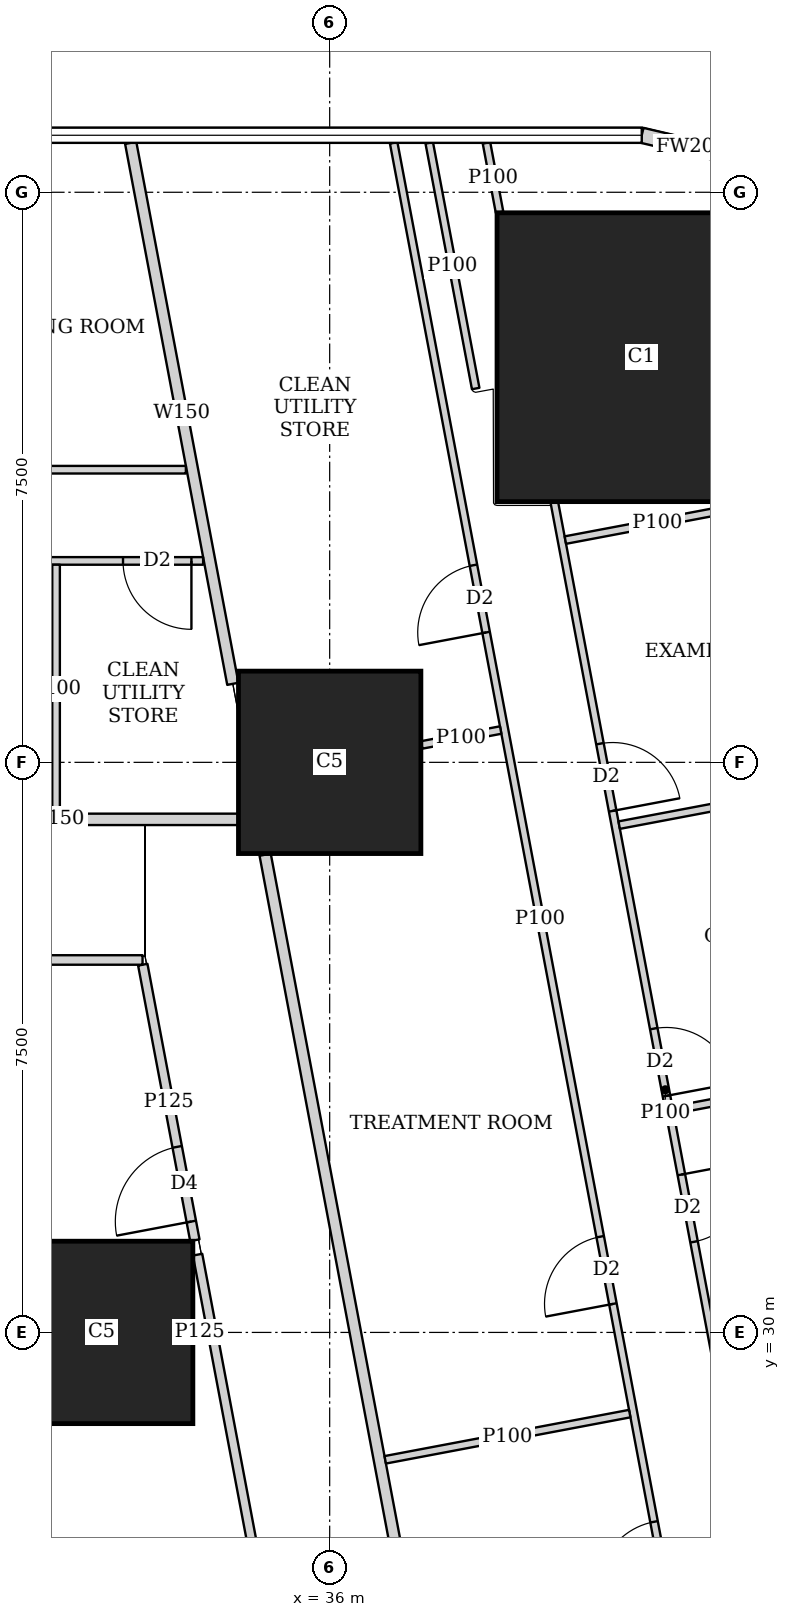
"""IFC4 building model, lengths in metres.
Left out: names, types, materials, properties, quantities, classifications, styles, units other than length and angle.
Written with IfcOpenShell. Run it as: python <this file> out.ifc"""

import sys

from ifc_helpers import new_model, si_unit, direction, frame, frame_2d, origin, origin_2d, place, context, subcontext, project, spatial, rectangle, extrude, element, fill, save


model = new_model("IFC4")
c1 = context("Model", 3, precision=1e-05, world=origin(), true_north=direction((0.0, 1.0)))
c2 = subcontext(c1, "Body", "Model", "MODEL_VIEW")
j1 = project(units=[si_unit("LENGTHUNIT", "METRE"), si_unit("PLANEANGLEUNIT", "RADIAN")], contexts=[c1])
p1 = place(None, origin())
s1 = spatial("IfcSite", under=j1, at=p1, CompositionType="ELEMENT")
p2 = place(p1, origin())
s2 = spatial("IfcBuilding", under=s1, at=p2, CompositionType="ELEMENT")
p3 = place(p2, frame((0.0, 0.0, 5.6)))
s3 = spatial("IfcBuildingStorey", under=s2, at=p3, CompositionType="ELEMENT", Elevation=5.6)
for number, where, z_axis, x_axis in (
    (1, (33.0, 30.0, 0.0), (0.0, 0.0, 1.0), (1.0, 0.0, 0.0)),
    (2, (36.0, 37.5, 0.0), (0.0, 0.0, 1.0), (1.0, 0.0, 0.0)),
):
    element("IfcColumn", number, at=place(p3, frame(where, z_axis=z_axis, x_axis=x_axis)), inside=s3, PredefinedType="COLUMN", context=c2, shape_type="SweptSolid", body=[
        extrude(rectangle(XDim=2.4, YDim=2.4, at=origin_2d()), origin(), (0.0, 0.0, 1.0), 4.5),
    ])
p4 = place(p3, frame((40.102, 42.83, 0.0), z_axis=(0.0, 0.0, 1.0), x_axis=(1.0, 0.0, 0.0)))
e3 = element("IfcColumn", 3, at=p4, inside=s3, PredefinedType="COLUMN", context=c2, shape_type="SweptSolid", body=[
    extrude(rectangle(XDim=3.8, YDim=3.8, at=origin_2d()), origin(), (0.0, 0.0, 1.0), 4.5),
])
p5 = place(p3, frame((41.407, 45.444, 0.0), z_axis=(0.0, 0.0, 1.0), x_axis=(-0.973453091607, 0.228886606077, 0.0)))
e4 = element("IfcWall", 4, at=p5, inside=s3, PredefinedType="SOLIDWALL", context=c2, shape_type="SweptSolid", body=[
    extrude(rectangle(XDim=1.336, YDim=0.2, at=frame_2d((0.668, 0.0))), origin(), (0.0, 0.0, 1.0), 4.2),
])
p6 = place(p3, frame((30.001, 36.75, 0.0), z_axis=(0.0, 0.0, 1.0), x_axis=(1.0, 0.0, 0.0)))
e5 = element("IfcWall", 5, at=p6, inside=s3, PredefinedType="SOLIDWALL", context=c2, shape_type="SweptSolid", body=[
    extrude(rectangle(XDim=4.798, YDim=0.15, at=frame_2d((2.399, 0.0))), origin(), (0.0, 0.0, 1.0), 2.6),
])
p7 = place(p3, frame((33.382, 45.65, 0.0), z_axis=(0.0, 0.0, 1.0), x_axis=(0.185564463355, -0.982632092871, 0.0)))
e6 = element("IfcWall", 6, at=p7, inside=s3, PredefinedType="SOLIDWALL", context=c2, shape_type="SweptSolid", body=[
    extrude(rectangle(XDim=7.243, YDim=0.15, at=frame_2d((3.621, 0.0))), origin(), (0.0, 0.0, 1.0), 2.4),
])
p8 = place(p3, frame((35.151, 36.285, 0.0), z_axis=(0.0, 0.0, 1.0), x_axis=(0.18558085056, -0.982628998099, 0.0)))
e7 = element("IfcWall", 7, at=p8, inside=s3, PredefinedType="SOLIDWALL", context=c2, shape_type="SweptSolid", body=[
    extrude(rectangle(XDim=34.352, YDim=0.15, at=frame_2d((17.176, 0.0))), origin(), (0.0, 0.0, 1.0), 2.4),
])
p9 = place(p8, frame((13.189, 0.0, 0.0)))
e8 = element("IfcOpeningElement", 8, at=p9, cuts=e7, PredefinedType="OPENING", context=c2, shape_type="SweptSolid", body=[
    extrude(rectangle(XDim=1.3, YDim=2.1, at=frame_2d((0.65, 1.05))), frame((0.0, 0.085, 0.0), z_axis=(0.0, -1.0, 0.0), x_axis=(1.0, 0.0, 0.0)), (0.0, 0.0, 1.0), 0.17),
])
p10 = place(p8, frame((19.443, 0.0, 0.0)))
e9 = element("IfcOpeningElement", 9, at=p10, cuts=e7, PredefinedType="OPENING", context=c2, shape_type="SweptSolid", body=[
    extrude(rectangle(XDim=1.3, YDim=2.1, at=frame_2d((0.65, 1.05))), frame((0.0, 0.085, 0.0), z_axis=(0.0, -1.0, 0.0), x_axis=(1.0, 0.0, 0.0)), (0.0, 0.0, 1.0), 0.17),
])
p11 = place(p8, frame((25.444, 0.0, 0.0)))
e10 = element("IfcOpeningElement", 10, at=p11, cuts=e7, PredefinedType="OPENING", context=c2, shape_type="SweptSolid", body=[
    extrude(rectangle(XDim=1.3, YDim=2.1, at=frame_2d((0.65, 1.05))), frame((0.0, 0.085, 0.0), z_axis=(0.0, -1.0, 0.0), x_axis=(1.0, 0.0, 0.0)), (0.0, 0.0, 1.0), 0.17),
])
p12 = place(p3, frame((37.921, 42.418, 0.0), z_axis=(0.0, 0.0, 1.0), x_axis=(-0.185713480744, 0.982603940085, 0.0)))
e11 = element("IfcWall", 11, at=p12, inside=s3, PredefinedType="PARTITIONING", context=c2, shape_type="SweptSolid", body=[
    extrude(rectangle(XDim=3.289, YDim=0.1, at=frame_2d((1.645, 0.0))), origin(), (0.0, 0.0, 1.0), 2.4),
])
p13 = place(p3, frame((38.063, 45.65, 0.0), z_axis=(0.0, 0.0, 1.0), x_axis=(0.185288147753, -0.982684233262, 0.0)))
e12 = element("IfcWall", 12, at=p13, inside=s3, PredefinedType="PARTITIONING", context=c2, shape_type="SweptSolid", body=[
    extrude(rectangle(XDim=0.929, YDim=0.1, at=frame_2d((0.464, 0.0))), origin(), (0.0, 0.0, 1.0), 4.2),
])
p14 = place(p3, frame((38.956, 40.92, 0.0), z_axis=(0.0, 0.0, 1.0), x_axis=(0.185636914727, -0.982618408077, 0.0)))
e13 = element("IfcWall", 13, at=p14, inside=s3, PredefinedType="PARTITIONING", context=c2, shape_type="SweptSolid", body=[
    extrude(rectangle(XDim=15.729, YDim=0.1, at=frame_2d((7.865, 0.0))), origin(), (0.0, 0.0, 1.0), 2.6),
])
p15 = place(p14, frame((14.679, 0.0, 0.0)))
e14 = element("IfcOpeningElement", 14, at=p15, cuts=e13, PredefinedType="OPENING", context=c2, shape_type="SweptSolid", body=[
    extrude(rectangle(XDim=0.9, YDim=2.1, at=frame_2d((0.45, 1.05))), frame((0.0, 0.06, 0.0), z_axis=(0.0, -1.0, 0.0), x_axis=(1.0, 0.0, 0.0)), (0.0, 0.0, 1.0), 0.12),
])
p16 = place(p14, frame((9.0, 0.0, 0.0)))
e15 = element("IfcOpeningElement", 15, at=p16, cuts=e13, PredefinedType="OPENING", context=c2, shape_type="SweptSolid", body=[
    extrude(rectangle(XDim=0.9, YDim=2.1, at=frame_2d((0.45, 1.05))), frame((0.0, 0.06, 0.0), z_axis=(0.0, -1.0, 0.0), x_axis=(1.0, 0.0, 0.0)), (0.0, 0.0, 1.0), 0.12),
])
p17 = place(p14, frame((7.046, 0.0, 0.0)))
e16 = element("IfcOpeningElement", 16, at=p17, cuts=e13, PredefinedType="OPENING", context=c2, shape_type="SweptSolid", body=[
    extrude(rectangle(XDim=0.9, YDim=2.1, at=frame_2d((0.45, 1.05))), frame((0.0, 0.06, 0.0), z_axis=(0.0, -1.0, 0.0), x_axis=(1.0, 0.0, 0.0)), (0.0, 0.0, 1.0), 0.12),
])
p18 = place(p14, frame((3.231, 0.0, 0.0)))
e17 = element("IfcOpeningElement", 17, at=p18, cuts=e13, PredefinedType="OPENING", context=c2, shape_type="SweptSolid", body=[
    extrude(rectangle(XDim=0.9, YDim=2.1, at=frame_2d((0.45, 1.05))), frame((0.0, 0.06, 0.0), z_axis=(0.0, -1.0, 0.0), x_axis=(1.0, 0.0, 0.0)), (0.0, 0.0, 1.0), 0.12),
])
p19 = place(p3, frame((36.842, 45.65, 0.0), z_axis=(0.0, 0.0, 1.0), x_axis=(0.185559483963, -0.982633033188, 0.0)))
e18 = element("IfcWall", 18, at=p19, inside=s3, PredefinedType="PARTITIONING", context=c2, shape_type="SweptSolid", body=[
    extrude(rectangle(XDim=20.77, YDim=0.1, at=frame_2d((10.385, 0.0))), origin(), (0.0, 0.0, 1.0), 2.4),
])
p20 = place(p19, frame((18.462, 0.0, 0.0)))
e19 = element("IfcOpeningElement", 19, at=p20, cuts=e18, PredefinedType="OPENING", context=c2, shape_type="SweptSolid", body=[
    extrude(rectangle(XDim=0.9, YDim=2.1, at=frame_2d((0.45, 1.05))), frame((0.0, 0.06, 0.0), z_axis=(0.0, -1.0, 0.0), x_axis=(1.0, 0.0, 0.0)), (0.0, 0.0, 1.0), 0.12),
])
p21 = place(p19, frame((14.645, 0.0, 0.0)))
e20 = element("IfcOpeningElement", 20, at=p21, cuts=e18, PredefinedType="OPENING", context=c2, shape_type="SweptSolid", body=[
    extrude(rectangle(XDim=0.9, YDim=2.1, at=frame_2d((0.45, 1.05))), frame((0.0, 0.06, 0.0), z_axis=(0.0, -1.0, 0.0), x_axis=(1.0, 0.0, 0.0)), (0.0, 0.0, 1.0), 0.12),
])
p22 = place(p19, frame((5.655, 0.0, 0.0)))
e21 = element("IfcOpeningElement", 21, at=p22, cuts=e18, PredefinedType="OPENING", context=c2, shape_type="SweptSolid", body=[
    extrude(rectangle(XDim=0.9, YDim=2.1, at=frame_2d((0.45, 1.05))), frame((0.0, 0.06, 0.0), z_axis=(0.0, -1.0, 0.0), x_axis=(1.0, 0.0, 0.0)), (0.0, 0.0, 1.0), 0.12),
])
p23 = place(p3, frame((41.521, 40.881, 0.0), z_axis=(0.0, 0.0, 1.0), x_axis=(-0.982628922785, -0.18558124934, 0.0)))
e22 = element("IfcWall", 22, at=p23, inside=s3, PredefinedType="PARTITIONING", context=c2, shape_type="SweptSolid", body=[
    extrude(rectangle(XDim=2.463, YDim=0.1, at=frame_2d((1.231, 0.0))), origin(), (0.0, 0.0, 1.0), 2.4),
])
p24 = place(p3, frame((43.985, 37.463, 0.0), z_axis=(0.0, 0.0, 1.0), x_axis=(-0.982623519589, -0.185609856287, 0.0)))
e23 = element("IfcWall", 23, at=p24, inside=s3, PredefinedType="PARTITIONING", context=c2, shape_type="SweptSolid", body=[
    extrude(rectangle(XDim=4.25, YDim=0.1, at=frame_2d((2.125, 0.0))), origin(), (0.0, 0.0, 1.0), 2.4),
])
p25 = place(p3, frame((44.693, 33.713, 0.0), z_axis=(0.0, 0.0, 1.0), x_axis=(-0.982615600536, -0.185651775062, 0.0)))
e24 = element("IfcWall", 24, at=p25, inside=s3, PredefinedType="PARTITIONING", context=c2, shape_type="SweptSolid", body=[
    extrude(rectangle(XDim=4.249, YDim=0.1, at=frame_2d((2.125, 0.0))), origin(), (0.0, 0.0, 1.0), 2.4),
])
p26 = place(p3, frame((38.25, 37.925, 0.0), z_axis=(0.0, 0.0, 1.0), x_axis=(-0.982694151031, -0.185235540676, 0.0)))
e25 = element("IfcWall", 25, at=p26, inside=s3, PredefinedType="PARTITIONING", context=c2, shape_type="SweptSolid", body=[
    extrude(rectangle(XDim=1.058, YDim=0.1, at=frame_2d((0.529, 0.0))), origin(), (0.0, 0.0, 1.0), 4.2),
])
p27 = place(p3, frame((39.948, 28.932, 0.0), z_axis=(0.0, 0.0, 1.0), x_axis=(-0.982610347627, -0.185679575441, 0.0)))
e26 = element("IfcWall", 26, at=p27, inside=s3, PredefinedType="PARTITIONING", context=c2, shape_type="SweptSolid", body=[
    extrude(rectangle(XDim=3.274, YDim=0.1, at=frame_2d((1.637, 0.0))), origin(), (0.0, 0.0, 1.0), 2.6),
])
p28 = place(p3, frame((21.6, 41.35, 0.0), z_axis=(0.0, 0.0, 1.0), x_axis=(1.0, 0.0, 0.0)))
e27 = element("IfcWall", 27, at=p28, inside=s3, PredefinedType="PARTITIONING", context=c2, shape_type="SweptSolid", body=[
    extrude(rectangle(XDim=12.508, YDim=0.1, at=frame_2d((6.254, 0.0))), origin(), (0.0, 0.0, 1.0), 2.6),
])
p29 = place(p28, frame((0.2, 0.0, 0.0)))
e28 = element("IfcOpeningElement", 28, at=p29, cuts=e27, PredefinedType="OPENING", context=c2, shape_type="SweptSolid", body=[
    extrude(rectangle(XDim=0.9, YDim=2.1, at=frame_2d((0.45, 1.05))), frame((0.0, 0.06, 0.0), z_axis=(0.0, -1.0, 0.0), x_axis=(1.0, 0.0, 0.0)), (0.0, 0.0, 1.0), 0.12),
])
p30 = place(p28, frame((3.8, 0.0, 0.0)))
e29 = element("IfcOpeningElement", 29, at=p30, cuts=e27, PredefinedType="OPENING", context=c2, shape_type="SweptSolid", body=[
    extrude(rectangle(XDim=0.9, YDim=2.1, at=frame_2d((0.45, 1.05))), frame((0.0, 0.06, 0.0), z_axis=(0.0, -1.0, 0.0), x_axis=(1.0, 0.0, 0.0)), (0.0, 0.0, 1.0), 0.12),
])
p31 = place(p28, frame((8.85, 0.0, 0.0)))
e30 = element("IfcOpeningElement", 30, at=p31, cuts=e27, PredefinedType="OPENING", context=c2, shape_type="SweptSolid", body=[
    extrude(rectangle(XDim=0.9, YDim=2.1, at=frame_2d((0.45, 1.05))), frame((0.0, 0.06, 0.0), z_axis=(0.0, -1.0, 0.0), x_axis=(1.0, 0.0, 0.0)), (0.0, 0.0, 1.0), 0.12),
])
p32 = place(p3, frame((21.6, 40.15, 0.0), z_axis=(0.0, 0.0, 1.0), x_axis=(1.0, 0.0, 0.0)))
e31 = element("IfcWall", 31, at=p32, inside=s3, PredefinedType="PARTITIONING", context=c2, shape_type="SweptSolid", body=[
    extrude(rectangle(XDim=12.735, YDim=0.1, at=frame_2d((6.367, 0.0))), origin(), (0.0, 0.0, 1.0), 2.6),
])
p33 = place(p32, frame((1.35, 0.0, 0.0)))
e32 = element("IfcOpeningElement", 32, at=p33, cuts=e31, PredefinedType="OPENING", context=c2, shape_type="SweptSolid", body=[
    extrude(rectangle(XDim=0.9, YDim=2.1, at=frame_2d((0.45, 1.05))), frame((0.0, 0.06, 0.0), z_axis=(0.0, -1.0, 0.0), x_axis=(1.0, 0.0, 0.0)), (0.0, 0.0, 1.0), 0.12),
])
p34 = place(p32, frame((4.95, 0.0, 0.0)))
e33 = element("IfcOpeningElement", 33, at=p34, cuts=e31, PredefinedType="OPENING", context=c2, shape_type="SweptSolid", body=[
    extrude(rectangle(XDim=0.9, YDim=2.1, at=frame_2d((0.45, 1.05))), frame((0.0, 0.06, 0.0), z_axis=(0.0, -1.0, 0.0), x_axis=(1.0, 0.0, 0.0)), (0.0, 0.0, 1.0), 0.12),
])
p35 = place(p32, frame((8.55, 0.0, 0.0)))
e34 = element("IfcOpeningElement", 34, at=p35, cuts=e31, PredefinedType="OPENING", context=c2, shape_type="SweptSolid", body=[
    extrude(rectangle(XDim=0.9, YDim=2.1, at=frame_2d((0.45, 1.05))), frame((0.0, 0.06, 0.0), z_axis=(0.0, -1.0, 0.0), x_axis=(1.0, 0.0, 0.0)), (0.0, 0.0, 1.0), 0.12),
])
p36 = place(p32, frame((11.681, 0.0, 0.0)))
e35 = element("IfcOpeningElement", 35, at=p36, cuts=e31, PredefinedType="OPENING", context=c2, shape_type="SweptSolid", body=[
    extrude(rectangle(XDim=0.9, YDim=2.1, at=frame_2d((0.45, 1.05))), frame((0.0, 0.06, 0.0), z_axis=(0.0, -1.0, 0.0), x_axis=(1.0, 0.0, 0.0)), (0.0, 0.0, 1.0), 0.12),
])
p37 = place(p3, frame((32.4, 36.825, 0.0), z_axis=(0.0, 0.0, 1.0), x_axis=(0.0, 1.0, 0.0)))
e36 = element("IfcWall", 36, at=p37, inside=s3, PredefinedType="PARTITIONING", context=c2, shape_type="SweptSolid", body=[
    extrude(rectangle(XDim=3.275, YDim=0.1, at=frame_2d((1.638, 0.0))), origin(), (0.0, 0.0, 1.0), 2.6),
])
p38 = place(p3, frame((28.95, 34.9, 0.0), z_axis=(0.0, 0.0, 1.0), x_axis=(1.0, 0.0, 0.0)))
e37 = element("IfcWall", 37, at=p38, inside=s3, PredefinedType="PARTITIONING", context=c2, shape_type="SweptSolid", body=[
    extrude(rectangle(XDim=4.588, YDim=0.125, at=frame_2d((2.294, 0.0))), origin(), (0.0, 0.0, 1.0), 2.2),
])
p39 = place(p3, frame((37.059, 16.213, 0.0), z_axis=(0.0, 0.0, 1.0), x_axis=(-0.185585225745, 0.982628171785, 0.0)))
e38 = element("IfcWall", 38, at=p39, inside=s3, PredefinedType="PARTITIONING", context=c2, shape_type="SweptSolid", body=[
    extrude(rectangle(XDim=15.072, YDim=0.125, at=frame_2d((7.536, 0.0))), origin(), (0.0, 0.0, 1.0), 2.6),
])
p40 = place(p39, frame((7.221, 0.0, 0.0)))
e39 = element("IfcOpeningElement", 39, at=p40, cuts=e38, PredefinedType="OPENING", context=c2, shape_type="SweptSolid", body=[
    extrude(rectangle(XDim=1.0, YDim=2.1, at=frame_2d((0.5, 1.05))), frame((0.0, 0.073, 0.0), z_axis=(0.0, -1.0, 0.0), x_axis=(1.0, 0.0, 0.0)), (0.0, 0.0, 1.0), 0.145),
])
p41 = place(p39, frame((0.25, 0.0, 0.0)))
e40 = element("IfcOpeningElement", 40, at=p41, cuts=e38, PredefinedType="OPENING", context=c2, shape_type="SweptSolid", body=[
    extrude(rectangle(XDim=1.0, YDim=2.1, at=frame_2d((0.5, 1.05))), frame((0.0, 0.073, 0.0), z_axis=(0.0, -1.0, 0.0), x_axis=(1.0, 0.0, 0.0)), (0.0, 0.0, 1.0), 0.145),
])
p42 = place(p39, frame((3.99, 0.0, 0.0)))
e41 = element("IfcOpeningElement", 41, at=p42, cuts=e38, PredefinedType="OPENING", context=c2, shape_type="SweptSolid", body=[
    extrude(rectangle(XDim=1.0, YDim=2.1, at=frame_2d((0.5, 1.05))), frame((0.0, 0.073, 0.0), z_axis=(0.0, -1.0, 0.0), x_axis=(1.0, 0.0, 0.0)), (0.0, 0.0, 1.0), 0.145),
])
p43 = place(p3, frame((34.226, 31.213, 0.0), z_axis=(0.0, 0.0, 1.0), x_axis=(-0.185694811189, 0.982607468472, 0.0)))
e42 = element("IfcWall", 42, at=p43, inside=s3, PredefinedType="PARTITIONING", context=c2, shape_type="SweptSolid", body=[
    extrude(rectangle(XDim=3.689, YDim=0.125, at=frame_2d((1.845, 0.0))), origin(), (0.0, 0.0, 1.0), 4.2),
])
p44 = place(p43, frame((0.25, 0.0, 0.0)))
e43 = element("IfcOpeningElement", 43, at=p44, cuts=e42, PredefinedType="OPENING", context=c2, shape_type="SweptSolid", body=[
    extrude(rectangle(XDim=1.0, YDim=2.1, at=frame_2d((0.5, 1.05))), frame((0.0, 0.073, 0.0), z_axis=(0.0, -1.0, 0.0), x_axis=(1.0, 0.0, 0.0)), (0.0, 0.0, 1.0), 0.145),
])
p45 = place(p3, frame((34.201, 30.0, 0.0), z_axis=(0.0, 0.0, 1.0), x_axis=(1.0, 0.0, 0.0)))
e44 = element("IfcWall", 44, at=p45, inside=s3, PredefinedType="PARTITIONING", context=c2, shape_type="SweptSolid", body=[
    extrude(rectangle(XDim=0.178, YDim=0.125, at=frame_2d((0.089, 0.0))), origin(), (0.0, 0.0, 1.0), 2.6),
])
p46 = place(p16, origin())
e45 = element("IfcDoor", 45, at=p46, inside=s3, OperationType="SINGLE_SWING_LEFT", PredefinedType="DOOR", context=c2, shape_type="SweptSolid", body=[
    extrude(rectangle(XDim=0.9, YDim=2.1, at=frame_2d((0.45, 1.05))), frame((0.0, 0.025, 0.0), z_axis=(0.0, -1.0, 0.0), x_axis=(1.0, 0.0, 0.0)), (0.0, 0.0, 1.0), 0.05),
])
fill(e15, e45)
p47 = place(p17, origin())
e46 = element("IfcDoor", 46, at=p47, inside=s3, OperationType="SINGLE_SWING_RIGHT", PredefinedType="DOOR", context=c2, shape_type="SweptSolid", body=[
    extrude(rectangle(XDim=0.9, YDim=2.1, at=frame_2d((0.45, 1.05))), frame((0.0, 0.025, 0.0), z_axis=(0.0, -1.0, 0.0), x_axis=(1.0, 0.0, 0.0)), (0.0, 0.0, 1.0), 0.05),
])
fill(e16, e46)
p48 = place(p18, origin())
e47 = element("IfcDoor", 47, at=p48, inside=s3, OperationType="SINGLE_SWING_RIGHT", PredefinedType="DOOR", context=c2, shape_type="SweptSolid", body=[
    extrude(rectangle(XDim=0.9, YDim=2.1, at=frame_2d((0.45, 1.05))), frame((0.0, 0.025, 0.0), z_axis=(0.0, -1.0, 0.0), x_axis=(1.0, 0.0, 0.0)), (0.0, 0.0, 1.0), 0.05),
])
fill(e17, e47)
p49 = place(p20, origin())
e48 = element("IfcDoor", 48, at=p49, inside=s3, OperationType="SINGLE_SWING_LEFT", PredefinedType="DOOR", context=c2, shape_type="SweptSolid", body=[
    extrude(rectangle(XDim=0.9, YDim=2.1, at=frame_2d((0.45, 1.05))), frame((0.0, 0.025, 0.0), z_axis=(0.0, -1.0, 0.0), x_axis=(1.0, 0.0, 0.0)), (0.0, 0.0, 1.0), 0.05),
])
fill(e19, e48)
p50 = place(p21, origin())
e49 = element("IfcDoor", 49, at=p50, inside=s3, OperationType="SINGLE_SWING_LEFT", PredefinedType="DOOR", context=c2, shape_type="SweptSolid", body=[
    extrude(rectangle(XDim=0.9, YDim=2.1, at=frame_2d((0.45, 1.05))), frame((0.0, 0.025, 0.0), z_axis=(0.0, -1.0, 0.0), x_axis=(1.0, 0.0, 0.0)), (0.0, 0.0, 1.0), 0.05),
])
fill(e20, e49)
p51 = place(p22, origin())
e50 = element("IfcDoor", 50, at=p51, inside=s3, OperationType="SINGLE_SWING_LEFT", PredefinedType="DOOR", context=c2, shape_type="SweptSolid", body=[
    extrude(rectangle(XDim=0.9, YDim=2.1, at=frame_2d((0.45, 1.05))), frame((0.0, 0.025, 0.0), z_axis=(0.0, -1.0, 0.0), x_axis=(1.0, 0.0, 0.0)), (0.0, 0.0, 1.0), 0.05),
])
fill(e21, e50)
p52 = place(p36, origin())
e51 = element("IfcDoor", 51, at=p52, inside=s3, OperationType="SINGLE_SWING_LEFT", PredefinedType="DOOR", context=c2, shape_type="SweptSolid", body=[
    extrude(rectangle(XDim=0.9, YDim=2.1, at=frame_2d((0.45, 1.05))), frame((0.0, 0.025, 0.0), z_axis=(0.0, -1.0, 0.0), x_axis=(1.0, 0.0, 0.0)), (0.0, 0.0, 1.0), 0.05),
])
fill(e35, e51)
p53 = place(p44, origin())
e52 = element("IfcDoor", 52, at=p53, inside=s3, OperationType="SINGLE_SWING_LEFT", PredefinedType="DOOR", context=c2, shape_type="SweptSolid", body=[
    extrude(rectangle(XDim=1.0, YDim=2.1, at=frame_2d((0.5, 1.05))), frame((0.0, 0.025, 0.0), z_axis=(0.0, -1.0, 0.0), x_axis=(1.0, 0.0, 0.0)), (0.0, 0.0, 1.0), 0.05),
])
fill(e43, e52)
save(model, sys.argv[1])
